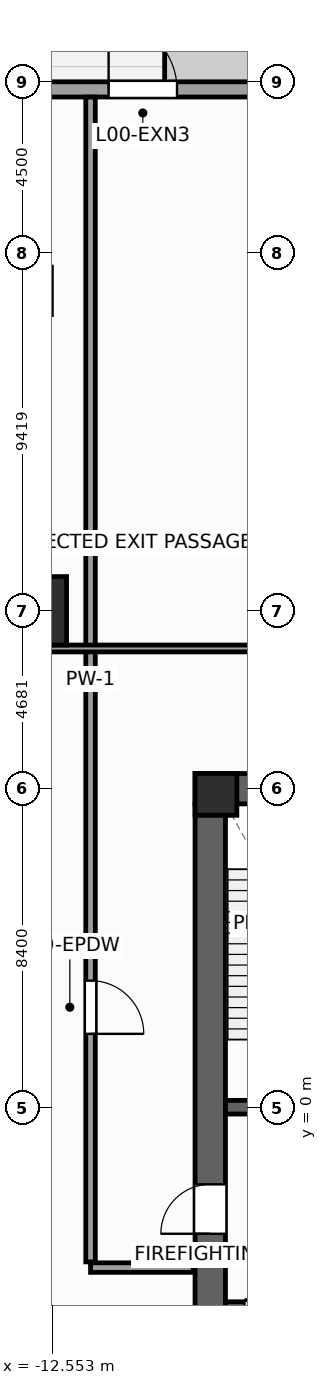
"""IFC4 building model, lengths in metres.
Left out: names, types, materials, properties, quantities, classifications, styles, units other than length and angle.
Written with IfcOpenShell. Run it as: python <this file> out.ifc"""

import sys

from ifc_helpers import new_model, si_unit, direction, frame, frame_2d, origin, origin_2d, place, context, subcontext, project, spatial, rectangle, extrude, source, transform, mapped, element, fill, save


model = new_model("IFC4")
c1 = context("Model", 3, precision=1e-05, world=origin(), true_north=direction((0.0, 1.0)))
c2 = subcontext(c1, "Body", "Model", "MODEL_VIEW")
j1 = project(units=[si_unit("LENGTHUNIT", "METRE"), si_unit("PLANEANGLEUNIT", "RADIAN")], contexts=[c1])
p1 = place(None, origin())
s1 = spatial("IfcSite", under=j1, at=p1, CompositionType="ELEMENT")
p2 = place(p1, origin())
s2 = spatial("IfcBuilding", under=s1, at=p2, CompositionType="ELEMENT")
p3 = place(p2, origin())
s3 = spatial("IfcBuildingStorey", under=s2, at=p3, CompositionType="ELEMENT", Elevation=0.0)
p4 = place(p3, frame((-8.8, 8.4, 0.0), z_axis=(0.0, 0.0, 1.0), x_axis=(1.0, 0.0, 0.0)))
e1 = element("IfcWall", 1, at=p4, inside=s3, PredefinedType="SHEAR", context=c2, shape_type="SweptSolid", body=[
    extrude(rectangle(XDim=17.6, YDim=0.8, at=frame_2d((8.8, 0.0))), origin(), (0.0, 0.0, 1.0), 6.0),
])
p5 = place(p4, frame((8.15, 0.0, 0.0)))
e2 = element("IfcOpeningElement", 2, at=p5, cuts=e1, PredefinedType="OPENING", context=c2, shape_type="SweptSolid", body=[
    extrude(rectangle(XDim=1.3, YDim=2.2, at=frame_2d((0.65, 1.1))), frame((0.0, 0.41, 0.0), z_axis=(0.0, -1.0, 0.0), x_axis=(1.0, 0.0, 0.0)), (0.0, 0.0, 1.0), 0.82),
])
p6 = place(p3, frame((-8.4, -8.0, 0.0), z_axis=(0.0, 0.0, 1.0), x_axis=(0.0, 1.0, 0.0)))
e3 = element("IfcWall", 3, at=p6, inside=s3, PredefinedType="SHEAR", context=c2, shape_type="SweptSolid", body=[
    extrude(rectangle(XDim=16.0, YDim=0.8, at=frame_2d((8.0, 0.0))), origin(), (0.0, 0.0, 1.0), 6.0),
])
p7 = place(p6, frame((4.69, 0.0, 0.0)))
e4 = element("IfcOpeningElement", 4, at=p7, cuts=e3, PredefinedType="OPENING", context=c2, shape_type="SweptSolid", body=[
    extrude(rectangle(XDim=1.3, YDim=2.2, at=frame_2d((0.65, 1.1))), frame((0.0, 0.41, 0.0), z_axis=(0.0, -1.0, 0.0), x_axis=(1.0, 0.0, 0.0)), (0.0, 0.0, 1.0), 0.82),
])
p8 = place(p3, frame((-8.0, 0.02, 0.0), z_axis=(0.0, 0.0, 1.0), x_axis=(1.0, 0.0, 0.0)))
e5 = element("IfcWall", 5, at=p8, inside=s3, PredefinedType="SHEAR", context=c2, shape_type="SweptSolid", body=[
    extrude(rectangle(XDim=3.46, YDim=0.36, at=frame_2d((1.73, 0.0))), origin(), (0.0, 0.0, 1.0), 6.0),
])
p9 = place(p8, frame((1.03, 0.0, 0.0)))
e6 = element("IfcOpeningElement", 6, at=p9, cuts=e5, PredefinedType="OPENING", context=c2, shape_type="SweptSolid", body=[
    extrude(rectangle(XDim=1.4, YDim=2.2, at=frame_2d((0.7, 1.1))), frame((0.0, 0.19, 0.0), z_axis=(0.0, -1.0, 0.0), x_axis=(1.0, 0.0, 0.0)), (0.0, 0.0, 1.0), 0.38),
])
p10 = place(p3, frame((-8.0, -5.28, 0.0), z_axis=(0.0, 0.0, 1.0), x_axis=(1.0, 0.0, 0.0)))
e7 = element("IfcWall", 7, at=p10, inside=s3, PredefinedType="SHEAR", context=c2, shape_type="SweptSolid", body=[
    extrude(rectangle(XDim=3.46, YDim=0.36, at=frame_2d((1.73, 0.0))), origin(), (0.0, 0.0, 1.0), 6.0),
])
p11 = place(p10, frame((0.5, 0.0, 0.0)))
e8 = element("IfcOpeningElement", 8, at=p11, cuts=e7, PredefinedType="OPENING", context=c2, shape_type="SweptSolid", body=[
    extrude(rectangle(XDim=1.2, YDim=2.25, at=frame_2d((0.6, 1.125))), frame((0.0, 0.19, 0.0), z_axis=(0.0, -1.0, 0.0), x_axis=(1.0, 0.0, 0.0)), (0.0, 0.0, 1.0), 0.38),
])
m1 = source(origin(), c2, "Body", "SweptSolid", [
    extrude(rectangle(XDim=1.1, YDim=1.1, at=origin_2d()), origin(), (0.0, 0.0, 1.0), 6.0),
])
p12 = place(p3, frame((-8.25, 8.25, 0.0), z_axis=(0.0, 0.0, 1.0), x_axis=(1.0, 0.0, 0.0)))
e9 = element("IfcColumn", 9, at=p12, inside=s3, PredefinedType="PILASTER", context=c2, shape_type="MappedRepresentation", body=[
    mapped(m1, transform((0.0, 0.0, 0.0), scale=1.0)),
])
m2 = source(origin(), c2, "Body", "SweptSolid", [
    extrude(rectangle(XDim=1.8, YDim=1.8, at=origin_2d()), origin(), (0.0, 0.0, 1.0), 6.0),
])
p13 = place(p3, frame((-13.081, 13.081, 0.0), z_axis=(0.0, 0.0, 1.0), x_axis=(1.0, 0.0, 0.0)))
e10 = element("IfcColumn", 10, at=p13, inside=s3, PredefinedType="COLUMN", context=c2, shape_type="MappedRepresentation", body=[
    mapped(m2, transform((0.0, 0.0, 0.0), scale=1.0)),
])
p14 = place(p3, frame((-30.0, 26.8, 0.0), z_axis=(0.0, 0.0, 1.0), x_axis=(1.0, 0.0, 0.0)))
e11 = element("IfcWall", 11, at=p14, inside=s3, PredefinedType="STANDARD", context=c2, shape_type="SweptSolid", body=[
    extrude(rectangle(XDim=50.0, YDim=0.4, at=frame_2d((25.0, 0.0))), origin(), (0.0, 0.0, 1.0), 5.66),
])
p15 = place(p14, frame((9.6, 0.0, 0.0)))
e12 = element("IfcOpeningElement", 12, at=p15, cuts=e11, PredefinedType="OPENING", context=c2, shape_type="SweptSolid", body=[
    extrude(rectangle(XDim=1.8, YDim=2.4, at=frame_2d((0.9, 1.2))), frame((0.0, 0.21, 0.0), z_axis=(0.0, -1.0, 0.0), x_axis=(1.0, 0.0, 0.0)), (0.0, 0.0, 1.0), 0.42),
])
p16 = place(p14, frame((14.3, 0.0, 0.0)))
e13 = element("IfcOpeningElement", 13, at=p16, cuts=e11, PredefinedType="OPENING", context=c2, shape_type="SweptSolid", body=[
    extrude(rectangle(XDim=1.8, YDim=2.4, at=frame_2d((0.9, 1.2))), frame((0.0, 0.21, 0.0), z_axis=(0.0, -1.0, 0.0), x_axis=(1.0, 0.0, 0.0)), (0.0, 0.0, 1.0), 0.42),
])
p17 = place(p14, frame((18.925, 0.0, 0.0)))
e14 = element("IfcOpeningElement", 14, at=p17, cuts=e11, PredefinedType="OPENING", context=c2, shape_type="SweptSolid", body=[
    extrude(rectangle(XDim=1.8, YDim=2.4, at=frame_2d((0.9, 1.2))), frame((0.0, 0.21, 0.0), z_axis=(0.0, -1.0, 0.0), x_axis=(1.0, 0.0, 0.0)), (0.0, 0.0, 1.0), 0.42),
])
p18 = place(p14, frame((23.9, 0.0, 0.0)))
e15 = element("IfcOpeningElement", 15, at=p18, cuts=e11, PredefinedType="OPENING", context=c2, shape_type="SweptSolid", body=[
    extrude(rectangle(XDim=1.8, YDim=2.4, at=frame_2d((0.9, 1.2))), frame((0.0, 0.21, 0.0), z_axis=(0.0, -1.0, 0.0), x_axis=(1.0, 0.0, 0.0)), (0.0, 0.0, 1.0), 0.42),
])
p19 = place(p14, frame((34.3, 0.0, 0.0)))
e16 = element("IfcOpeningElement", 16, at=p19, cuts=e11, PredefinedType="OPENING", context=c2, shape_type="SweptSolid", body=[
    extrude(rectangle(XDim=1.8, YDim=2.4, at=frame_2d((0.9, 1.2))), frame((0.0, 0.21, 0.0), z_axis=(0.0, -1.0, 0.0), x_axis=(1.0, 0.0, 0.0)), (0.0, 0.0, 1.0), 0.42),
])
p20 = place(p14, frame((39.275, 0.0, 0.0)))
e17 = element("IfcOpeningElement", 17, at=p20, cuts=e11, PredefinedType="OPENING", context=c2, shape_type="SweptSolid", body=[
    extrude(rectangle(XDim=1.8, YDim=2.4, at=frame_2d((0.9, 1.2))), frame((0.0, 0.21, 0.0), z_axis=(0.0, -1.0, 0.0), x_axis=(1.0, 0.0, 0.0)), (0.0, 0.0, 1.0), 0.42),
])
p21 = place(p14, frame((46.6, 0.0, 0.0)))
e18 = element("IfcOpeningElement", 18, at=p21, cuts=e11, PredefinedType="OPENING", context=c2, shape_type="SweptSolid", body=[
    extrude(rectangle(XDim=1.8, YDim=2.4, at=frame_2d((0.9, 1.2))), frame((0.0, 0.21, 0.0), z_axis=(0.0, -1.0, 0.0), x_axis=(1.0, 0.0, 0.0)), (0.0, 0.0, 1.0), 0.42),
])
p22 = place(p3, frame((-11.55, -4.05, 0.0), z_axis=(0.0, 0.0, 1.0), x_axis=(0.0, 1.0, 0.0)))
e19 = element("IfcWall", 19, at=p22, inside=s3, PredefinedType="PARTITIONING", context=c2, shape_type="SweptSolid", body=[
    extrude(rectangle(XDim=30.648, YDim=0.25, at=frame_2d((15.324, 0.0))), origin(), (0.0, 0.0, 1.0), 5.66),
])
p23 = place(p22, frame((6.0, 0.0, 0.0)))
e20 = element("IfcOpeningElement", 20, at=p23, cuts=e19, PredefinedType="OPENING", context=c2, shape_type="SweptSolid", body=[
    extrude(rectangle(XDim=1.4, YDim=2.2, at=frame_2d((0.7, 1.1))), frame((0.0, 0.135, 0.0), z_axis=(0.0, -1.0, 0.0), x_axis=(1.0, 0.0, 0.0)), (0.0, 0.0, 1.0), 0.27),
])
p24 = place(p3, frame((-11.55, -4.2, 0.0), z_axis=(0.0, 0.0, 1.0), x_axis=(1.0, 0.0, 0.0)))
e21 = element("IfcWall", 21, at=p24, inside=s3, PredefinedType="PARTITIONING", context=c2, shape_type="SweptSolid", body=[
    extrude(rectangle(XDim=2.7, YDim=0.25, at=frame_2d((1.35, 0.0))), origin(), (0.0, 0.0, 1.0), 5.66),
])
p25 = place(p3, frame((-14.5, 12.09, 0.0), z_axis=(0.0, 0.0, 1.0), x_axis=(1.0, 0.0, 0.0)))
e22 = element("IfcWall", 22, at=p25, inside=s3, PredefinedType="PARTITIONING", context=c2, shape_type="SweptSolid", body=[
    extrude(rectangle(XDim=29.0, YDim=0.18, at=frame_2d((14.5, 0.0))), origin(), (0.0, 0.0, 1.0), 5.66),
])
p26 = place(p25, frame((13.7, 0.0, 0.0)))
e23 = element("IfcOpeningElement", 23, at=p26, cuts=e22, PredefinedType="OPENING", context=c2, shape_type="SweptSolid", body=[
    extrude(rectangle(XDim=1.6, YDim=2.5, at=frame_2d((0.8, 1.25))), frame((0.0, 0.1, 0.0), z_axis=(0.0, -1.0, 0.0), x_axis=(1.0, 0.0, 0.0)), (0.0, 0.0, 1.0), 0.2),
])
m3 = source(origin(), c2, "Body", "SweptSolid", [
    extrude(rectangle(XDim=1.8, YDim=2.4, at=frame_2d((0.9, 1.2))), frame((0.0, 0.025, 0.0), z_axis=(0.0, -1.0, 0.0), x_axis=(1.0, 0.0, 0.0)), (0.0, 0.0, 1.0), 0.05),
])
p27 = place(p17, origin())
e24 = element("IfcDoor", 24, at=p27, inside=s3, OperationType="SINGLE_SWING_LEFT", PredefinedType="DOOR", context=c2, shape_type="MappedRepresentation", body=[
    mapped(m3, transform((0.0, 0.0, 0.0), scale=1.0)),
])
fill(e14, e24)
m4 = source(origin(), c2, "Body", "SweptSolid", [
    extrude(rectangle(XDim=1.3, YDim=2.2, at=frame_2d((0.65, 1.1))), frame((0.0, 0.025, 0.0), z_axis=(0.0, -1.0, 0.0), x_axis=(1.0, 0.0, 0.0)), (0.0, 0.0, 1.0), 0.05),
])
p28 = place(p7, origin())
e25 = element("IfcDoor", 25, at=p28, inside=s3, OperationType="SINGLE_SWING_LEFT", PredefinedType="DOOR", context=c2, shape_type="MappedRepresentation", body=[
    mapped(m4, transform((0.0, 0.0, 0.0), scale=1.0)),
])
fill(e4, e25)
m5 = source(origin(), c2, "Body", "SweptSolid", [
    extrude(rectangle(XDim=1.4, YDim=2.2, at=frame_2d((0.7, 1.1))), frame((0.0, 0.025, 0.0), z_axis=(0.0, -1.0, 0.0), x_axis=(1.0, 0.0, 0.0)), (0.0, 0.0, 1.0), 0.05),
])
p29 = place(p23, frame((1.4, 0.0, 0.0), z_axis=(0.0, 0.0, 1.0), x_axis=(-1.0, 0.0, 0.0)))
e26 = element("IfcDoor", 26, at=p29, inside=s3, OperationType="SINGLE_SWING_LEFT", PredefinedType="DOOR", context=c2, shape_type="MappedRepresentation", body=[
    mapped(m5, transform((0.0, 0.0, 0.0), scale=1.0)),
])
fill(e20, e26)
save(model, sys.argv[1])
